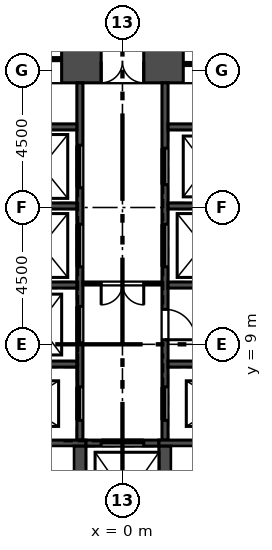
"""IFC4 building model, lengths in metres.
Left out: names, types, materials, properties, quantities, classifications, styles, units other than length and angle.
Written with IfcOpenShell. Run it as: python <this file> out.ifc"""

import sys

from ifc_helpers import new_model, si_unit, direction, frame, frame_2d, origin, place, context, subcontext, project, spatial, rectangle, extrude, element, fill, save


model = new_model("IFC4")
c1 = context("Model", 3, precision=1e-05, world=origin(), true_north=direction((0.0, 1.0)))
c2 = subcontext(c1, "Body", "Model", "MODEL_VIEW")
j1 = project(units=[si_unit("LENGTHUNIT", "METRE"), si_unit("PLANEANGLEUNIT", "RADIAN")], contexts=[c1])
p1 = place(None, origin())
s1 = spatial("IfcSite", under=j1, at=p1, CompositionType="ELEMENT")
p2 = place(p1, origin())
s2 = spatial("IfcBuilding", under=s1, at=p2, CompositionType="ELEMENT")
p3 = place(p2, origin())
s3 = spatial("IfcBuildingStorey", under=s2, at=p3, CompositionType="ELEMENT", Elevation=0.0)
p4 = place(p3, frame((9.412, 18.3, 0.0), z_axis=(0.0, 0.0, 1.0), x_axis=(-1.0, 0.0, 0.0)))
e1 = element("IfcWall", 1, at=p4, inside=s3, PredefinedType="SHEAR", context=c2, shape_type="SweptSolid", body=[
    extrude(rectangle(XDim=18.823, YDim=1.4, at=frame_2d((9.412, 0.0))), origin(), (0.0, 0.0, 1.0), 8.0),
])
p5 = place(p4, frame((8.711, 0.0, 0.0)))
e2 = element("IfcOpeningElement", 2, at=p5, cuts=e1, PredefinedType="OPENING", context=c2, shape_type="SweptSolid", body=[
    extrude(rectangle(XDim=1.4, YDim=2.1, at=frame_2d((0.7, 1.05))), frame((0.0, 0.71, 0.0), z_axis=(0.0, -1.0, 0.0), x_axis=(1.0, 0.0, 0.0)), (0.0, 0.0, 1.0), 1.42),
])
p6 = place(p4, frame((11.412, 0.0, 0.0)))
e3 = element("IfcOpeningElement", 3, at=p6, cuts=e1, PredefinedType="OPENING", context=c2, shape_type="SweptSolid", body=[
    extrude(rectangle(XDim=6.0, YDim=2.4, at=frame_2d((3.0, 1.2))), frame((0.0, 0.71, 0.0), z_axis=(0.0, -1.0, 0.0), x_axis=(1.0, 0.0, 0.0)), (0.0, 0.0, 1.0), 1.42),
])
p7 = place(p4, frame((1.412, 0.0, 0.0)))
e4 = element("IfcOpeningElement", 4, at=p7, cuts=e1, PredefinedType="OPENING", context=c2, shape_type="SweptSolid", body=[
    extrude(rectangle(XDim=6.0, YDim=2.4, at=frame_2d((3.0, 1.2))), frame((0.0, 0.71, 0.0), z_axis=(0.0, -1.0, 0.0), x_axis=(1.0, 0.0, 0.0)), (0.0, 0.0, 1.0), 1.42),
])
p8 = place(p3, frame((-1.4, 5.85, -0.4), z_axis=(0.0, 0.0, 1.0), x_axis=(0.0, 1.0, 0.0)))
e5 = element("IfcWall", 5, at=p8, inside=s3, PredefinedType="SOLIDWALL", context=c2, shape_type="SweptSolid", body=[
    extrude(rectangle(XDim=11.75, YDim=0.2, at=frame_2d((5.875, 0.0))), origin(), (0.0, 0.0, 1.0), 8.1),
])
p9 = place(p8, frame((3.2, 0.0, 0.4)))
e6 = element("IfcOpeningElement", 6, at=p9, cuts=e5, PredefinedType="OPENING", context=c2, shape_type="SweptSolid", body=[
    extrude(rectangle(XDim=1.2, YDim=2.1, at=frame_2d((0.6, 1.05))), frame((0.0, 0.11, 0.0), z_axis=(0.0, -1.0, 0.0), x_axis=(1.0, 0.0, 0.0)), (0.0, 0.0, 1.0), 0.22),
])
p10 = place(p8, frame((5.7, 0.0, 0.4)))
e7 = element("IfcOpeningElement", 7, at=p10, cuts=e5, PredefinedType="OPENING", context=c2, shape_type="SweptSolid", body=[
    extrude(rectangle(XDim=1.4, YDim=2.1, at=frame_2d((0.7, 1.05))), frame((0.0, 0.11, 0.0), z_axis=(0.0, -1.0, 0.0), x_axis=(1.0, 0.0, 0.0)), (0.0, 0.0, 1.0), 0.22),
])
p11 = place(p8, frame((8.3, 0.0, 0.4)))
e8 = element("IfcOpeningElement", 8, at=p11, cuts=e5, PredefinedType="OPENING", context=c2, shape_type="SweptSolid", body=[
    extrude(rectangle(XDim=1.4, YDim=2.1, at=frame_2d((0.7, 1.05))), frame((0.0, 0.11, 0.0), z_axis=(0.0, -1.0, 0.0), x_axis=(1.0, 0.0, 0.0)), (0.0, 0.0, 1.0), 0.22),
])
p12 = place(p8, frame((0.65, 0.0, 0.4)))
e9 = element("IfcOpeningElement", 9, at=p12, cuts=e5, PredefinedType="OPENING", context=c2, shape_type="SweptSolid", body=[
    extrude(rectangle(XDim=1.1, YDim=2.1, at=frame_2d((0.55, 1.05))), frame((0.0, 0.11, 0.0), z_axis=(0.0, -1.0, 0.0), x_axis=(1.0, 0.0, 0.0)), (0.0, 0.0, 1.0), 0.22),
])
p13 = place(p3, frame((1.4, 5.85, -0.4), z_axis=(0.0, 0.0, 1.0), x_axis=(0.0, 1.0, 0.0)))
e10 = element("IfcWall", 10, at=p13, inside=s3, PredefinedType="SOLIDWALL", context=c2, shape_type="SweptSolid", body=[
    extrude(rectangle(XDim=11.75, YDim=0.2, at=frame_2d((5.875, 0.0))), origin(), (0.0, 0.0, 1.0), 8.1),
])
p14 = place(p13, frame((5.7, 0.0, 0.4)))
e11 = element("IfcOpeningElement", 11, at=p14, cuts=e10, PredefinedType="OPENING", context=c2, shape_type="SweptSolid", body=[
    extrude(rectangle(XDim=1.4, YDim=2.1, at=frame_2d((0.7, 1.05))), frame((0.0, 0.11, 0.0), z_axis=(0.0, -1.0, 0.0), x_axis=(1.0, 0.0, 0.0)), (0.0, 0.0, 1.0), 0.22),
])
p15 = place(p13, frame((8.4, 0.0, 0.4)))
e12 = element("IfcOpeningElement", 12, at=p15, cuts=e10, PredefinedType="OPENING", context=c2, shape_type="SweptSolid", body=[
    extrude(rectangle(XDim=1.2, YDim=2.1, at=frame_2d((0.6, 1.05))), frame((0.0, 0.11, 0.0), z_axis=(0.0, -1.0, 0.0), x_axis=(1.0, 0.0, 0.0)), (0.0, 0.0, 1.0), 0.22),
])
p16 = place(p13, frame((0.65, 0.0, 0.4)))
e13 = element("IfcOpeningElement", 13, at=p16, cuts=e10, PredefinedType="OPENING", context=c2, shape_type="SweptSolid", body=[
    extrude(rectangle(XDim=1.1, YDim=2.1, at=frame_2d((0.55, 1.05))), frame((0.0, 0.11, 0.0), z_axis=(0.0, -1.0, 0.0), x_axis=(1.0, 0.0, 0.0)), (0.0, 0.0, 1.0), 0.22),
])
p17 = place(p13, frame((3.3, 0.0, 0.4)))
e14 = element("IfcOpeningElement", 14, at=p17, cuts=e10, PredefinedType="OPENING", context=c2, shape_type="SweptSolid", body=[
    extrude(rectangle(XDim=1.0, YDim=2.1, at=frame_2d((0.5, 1.05))), frame((0.0, 0.11, 0.0), z_axis=(0.0, -1.0, 0.0), x_axis=(1.0, 0.0, 0.0)), (0.0, 0.0, 1.0), 0.22),
])
for number, where, z_axis, x_axis in (
    (15, (-5.7, 8.35, -0.4), (0.0, 0.0, 1.0), (1.0, 0.0, 0.0)),
    (16, (1.5, 8.35, -0.4), (0.0, 0.0, 1.0), (1.0, 0.0, 0.0)),
):
    element("IfcWall", number, at=place(p3, frame(where, z_axis=z_axis, x_axis=x_axis)), inside=s3, PredefinedType="SOLIDWALL", context=c2, shape_type="SweptSolid", body=[
        extrude(rectangle(XDim=4.2, YDim=0.2, at=frame_2d((2.1, 0.0))), origin(), (0.0, 0.0, 1.0), 8.1),
    ])
p18 = place(p3, frame((-12.6, 5.75, -0.4), z_axis=(0.0, 0.0, 1.0), x_axis=(1.0, 0.0, 0.0)))
e17 = element("IfcWall", 17, at=p18, inside=s3, PredefinedType="SOLIDWALL", context=c2, shape_type="SweptSolid", body=[
    extrude(rectangle(XDim=11.4, YDim=0.2, at=frame_2d((5.7, 0.0))), origin(), (0.0, 0.0, 1.0), 8.1),
])
p19 = place(p3, frame((-1.2, 5.75, -0.4), z_axis=(0.0, 0.0, 1.0), x_axis=(1.0, 0.0, 0.0)))
e18 = element("IfcWall", 18, at=p19, inside=s3, PredefinedType="SOLIDWALL", context=c2, shape_type="SweptSolid", body=[
    extrude(rectangle(XDim=2.4, YDim=0.2, at=frame_2d((1.2, 0.0))), origin(), (0.0, 0.0, 1.0), 8.1),
])
p20 = place(p19, frame((0.5, 0.0, 0.4)))
e19 = element("IfcOpeningElement", 19, at=p20, cuts=e18, PredefinedType="OPENING", context=c2, shape_type="SweptSolid", body=[
    extrude(rectangle(XDim=1.4, YDim=2.1, at=frame_2d((0.7, 1.05))), frame((0.0, 0.11, 0.0), z_axis=(0.0, -1.0, 0.0), x_axis=(1.0, 0.0, 0.0)), (0.0, 0.0, 1.0), 0.22),
])
p21 = place(p3, frame((1.2, 5.75, -0.4), z_axis=(0.0, 0.0, 1.0), x_axis=(1.0, 0.0, 0.0)))
e20 = element("IfcWall", 20, at=p21, inside=s3, PredefinedType="SOLIDWALL", context=c2, shape_type="SweptSolid", body=[
    extrude(rectangle(XDim=11.4, YDim=0.2, at=frame_2d((5.7, 0.0))), origin(), (0.0, 0.0, 1.0), 8.1),
])
for number, where, z_axis, x_axis in (
    (21, (-1.4, 2.25, -0.4), (0.0, 0.0, 1.0), (0.0, 1.0, 0.0)),
    (22, (1.4, 2.25, -0.4), (0.0, 0.0, 1.0), (0.0, 1.0, 0.0)),
):
    element("IfcWall", number, at=place(p3, frame(where, z_axis=z_axis, x_axis=x_axis)), inside=s3, PredefinedType="SOLIDWALL", context=c2, shape_type="SweptSolid", body=[
        extrude(rectangle(XDim=3.4, YDim=0.4, at=frame_2d((1.7, 0.0))), origin(), (0.0, 0.0, 1.0), 8.1),
    ])
for number, where, z_axis, x_axis in (
    (23, (-3.5, 10.95, -0.4), (0.0, 0.0, 1.0), (1.0, 0.0, 0.0)),
    (24, (-3.5, 13.55, -0.4), (0.0, 0.0, 1.0), (1.0, 0.0, 0.0)),
    (25, (-3.5, 16.15, -0.4), (0.0, 0.0, 1.0), (1.0, 0.0, 0.0)),
    (26, (1.5, 10.95, -0.4), (0.0, 0.0, 1.0), (1.0, 0.0, 0.0)),
    (27, (1.5, 13.55, -0.4), (0.0, 0.0, 1.0), (1.0, 0.0, 0.0)),
    (28, (1.5, 16.15, -0.4), (0.0, 0.0, 1.0), (1.0, 0.0, 0.0)),
):
    element("IfcWall", number, at=place(p3, frame(where, z_axis=z_axis, x_axis=x_axis)), inside=s3, PredefinedType="SOLIDWALL", context=c2, shape_type="SweptSolid", body=[
        extrude(rectangle(XDim=2.0, YDim=0.2, at=frame_2d((1.0, 0.0))), origin(), (0.0, 0.0, 1.0), 8.1),
    ])
p22 = place(p3, frame((-1.3, 11.0, 0.0), z_axis=(0.0, 0.0, 1.0), x_axis=(1.0, 0.0, 0.0)))
e29 = element("IfcWall", 29, at=p22, inside=s3, PredefinedType="PARTITIONING", context=c2, shape_type="SweptSolid", body=[
    extrude(rectangle(XDim=2.6, YDim=0.1, at=frame_2d((1.3, 0.0))), origin(), (0.0, 0.0, 1.0), 7.7),
])
p23 = place(p22, frame((0.6, 0.0, 0.0)))
e30 = element("IfcOpeningElement", 30, at=p23, cuts=e29, PredefinedType="OPENING", context=c2, shape_type="SweptSolid", body=[
    extrude(rectangle(XDim=1.4, YDim=2.1, at=frame_2d((0.7, 1.05))), frame((0.0, 0.06, 0.0), z_axis=(0.0, -1.0, 0.0), x_axis=(1.0, 0.0, 0.0)), (0.0, 0.0, 1.0), 0.12),
])
p24 = place(p9, origin())
e31 = element("IfcDoor", 31, at=p24, inside=s3, OperationType="SLIDING_TO_LEFT", PredefinedType="DOOR", context=c2, shape_type="SweptSolid", body=[
    extrude(rectangle(XDim=1.2, YDim=2.1, at=frame_2d((0.6, 1.05))), frame((0.0, 0.025, 0.0), z_axis=(0.0, -1.0, 0.0), x_axis=(1.0, 0.0, 0.0)), (0.0, 0.0, 1.0), 0.05),
])
fill(e6, e31)
p25 = place(p10, origin())
e32 = element("IfcDoor", 32, at=p25, inside=s3, OperationType="SLIDING_TO_LEFT", PredefinedType="DOOR", context=c2, shape_type="SweptSolid", body=[
    extrude(rectangle(XDim=1.4, YDim=2.1, at=frame_2d((0.7, 1.05))), frame((0.0, 0.025, 0.0), z_axis=(0.0, -1.0, 0.0), x_axis=(1.0, 0.0, 0.0)), (0.0, 0.0, 1.0), 0.05),
])
fill(e7, e32)
p26 = place(p11, origin())
e33 = element("IfcDoor", 33, at=p26, inside=s3, OperationType="SLIDING_TO_LEFT", PredefinedType="DOOR", context=c2, shape_type="SweptSolid", body=[
    extrude(rectangle(XDim=1.4, YDim=2.1, at=frame_2d((0.7, 1.05))), frame((0.0, 0.025, 0.0), z_axis=(0.0, -1.0, 0.0), x_axis=(1.0, 0.0, 0.0)), (0.0, 0.0, 1.0), 0.05),
])
fill(e8, e33)
p27 = place(p12, origin())
e34 = element("IfcDoor", 34, at=p27, inside=s3, OperationType="SLIDING_TO_RIGHT", PredefinedType="DOOR", context=c2, shape_type="SweptSolid", body=[
    extrude(rectangle(XDim=1.1, YDim=2.1, at=frame_2d((0.55, 1.05))), frame((0.0, 0.025, 0.0), z_axis=(0.0, -1.0, 0.0), x_axis=(1.0, 0.0, 0.0)), (0.0, 0.0, 1.0), 0.05),
])
fill(e9, e34)
p28 = place(p14, origin())
e35 = element("IfcDoor", 35, at=p28, inside=s3, OperationType="SLIDING_TO_LEFT", PredefinedType="DOOR", context=c2, shape_type="SweptSolid", body=[
    extrude(rectangle(XDim=1.4, YDim=2.1, at=frame_2d((0.7, 1.05))), frame((0.0, 0.025, 0.0), z_axis=(0.0, -1.0, 0.0), x_axis=(1.0, 0.0, 0.0)), (0.0, 0.0, 1.0), 0.05),
])
fill(e11, e35)
p29 = place(p15, origin())
e36 = element("IfcDoor", 36, at=p29, inside=s3, OperationType="SLIDING_TO_LEFT", PredefinedType="DOOR", context=c2, shape_type="SweptSolid", body=[
    extrude(rectangle(XDim=1.2, YDim=2.1, at=frame_2d((0.6, 1.05))), frame((0.0, 0.025, 0.0), z_axis=(0.0, -1.0, 0.0), x_axis=(1.0, 0.0, 0.0)), (0.0, 0.0, 1.0), 0.05),
])
fill(e12, e36)
p30 = place(p16, origin())
e37 = element("IfcDoor", 37, at=p30, inside=s3, OperationType="SLIDING_TO_RIGHT", PredefinedType="DOOR", context=c2, shape_type="SweptSolid", body=[
    extrude(rectangle(XDim=1.1, YDim=2.1, at=frame_2d((0.55, 1.05))), frame((0.0, 0.025, 0.0), z_axis=(0.0, -1.0, 0.0), x_axis=(1.0, 0.0, 0.0)), (0.0, 0.0, 1.0), 0.05),
])
fill(e13, e37)
p31 = place(p20, origin())
e38 = element("IfcDoor", 38, at=p31, inside=s3, OperationType="SLIDING_TO_LEFT", PredefinedType="DOOR", context=c2, shape_type="SweptSolid", body=[
    extrude(rectangle(XDim=1.4, YDim=2.1, at=frame_2d((0.7, 1.05))), frame((0.0, 0.025, 0.0), z_axis=(0.0, -1.0, 0.0), x_axis=(1.0, 0.0, 0.0)), (0.0, 0.0, 1.0), 0.05),
])
fill(e19, e38)
p32 = place(p17, frame((1.0, 0.0, 0.0), z_axis=(0.0, 0.0, 1.0), x_axis=(-1.0, 0.0, 0.0)))
e39 = element("IfcDoor", 39, at=p32, inside=s3, OperationType="SINGLE_SWING_RIGHT", PredefinedType="DOOR", context=c2, shape_type="SweptSolid", body=[
    extrude(rectangle(XDim=1.0, YDim=2.1, at=frame_2d((0.5, 1.05))), frame((0.0, 0.025, 0.0), z_axis=(0.0, -1.0, 0.0), x_axis=(1.0, 0.0, 0.0)), (0.0, 0.0, 1.0), 0.05),
])
fill(e14, e39)
p33 = place(p23, frame((1.4, 0.0, 0.0), z_axis=(0.0, 0.0, 1.0), x_axis=(-1.0, 0.0, 0.0)))
e40 = element("IfcDoor", 40, at=p33, inside=s3, OperationType="DOUBLE_DOOR_SINGLE_SWING", PredefinedType="DOOR", context=c2, shape_type="SweptSolid", body=[
    extrude(rectangle(XDim=1.4, YDim=2.1, at=frame_2d((0.7, 1.05))), frame((0.0, 0.025, 0.0), z_axis=(0.0, -1.0, 0.0), x_axis=(1.0, 0.0, 0.0)), (0.0, 0.0, 1.0), 0.05),
])
fill(e30, e40)
p34 = place(p5, origin())
e41 = element("IfcDoor", 41, at=p34, inside=s3, OperationType="DOUBLE_DOOR_SINGLE_SWING", PredefinedType="DOOR", context=c2, shape_type="SweptSolid", body=[
    extrude(rectangle(XDim=1.4, YDim=2.1, at=frame_2d((0.7, 1.05))), frame((0.0, 0.025, 0.0), z_axis=(0.0, -1.0, 0.0), x_axis=(1.0, 0.0, 0.0)), (0.0, 0.0, 1.0), 0.05),
])
fill(e2, e41)
p35 = place(p6, origin())
e42 = element("IfcDoor", 42, at=p35, inside=s3, OperationType="DOUBLE_DOOR_SLIDING", PredefinedType="DOOR", context=c2, shape_type="SweptSolid", body=[
    extrude(rectangle(XDim=6.0, YDim=2.4, at=frame_2d((3.0, 1.2))), frame((0.0, 0.025, 0.0), z_axis=(0.0, -1.0, 0.0), x_axis=(1.0, 0.0, 0.0)), (0.0, 0.0, 1.0), 0.05),
])
fill(e3, e42)
p36 = place(p7, origin())
e43 = element("IfcDoor", 43, at=p36, inside=s3, OperationType="DOUBLE_DOOR_SLIDING", PredefinedType="DOOR", context=c2, shape_type="SweptSolid", body=[
    extrude(rectangle(XDim=6.0, YDim=2.4, at=frame_2d((3.0, 1.2))), frame((0.0, 0.025, 0.0), z_axis=(0.0, -1.0, 0.0), x_axis=(1.0, 0.0, 0.0)), (0.0, 0.0, 1.0), 0.05),
])
fill(e4, e43)
save(model, sys.argv[1])
